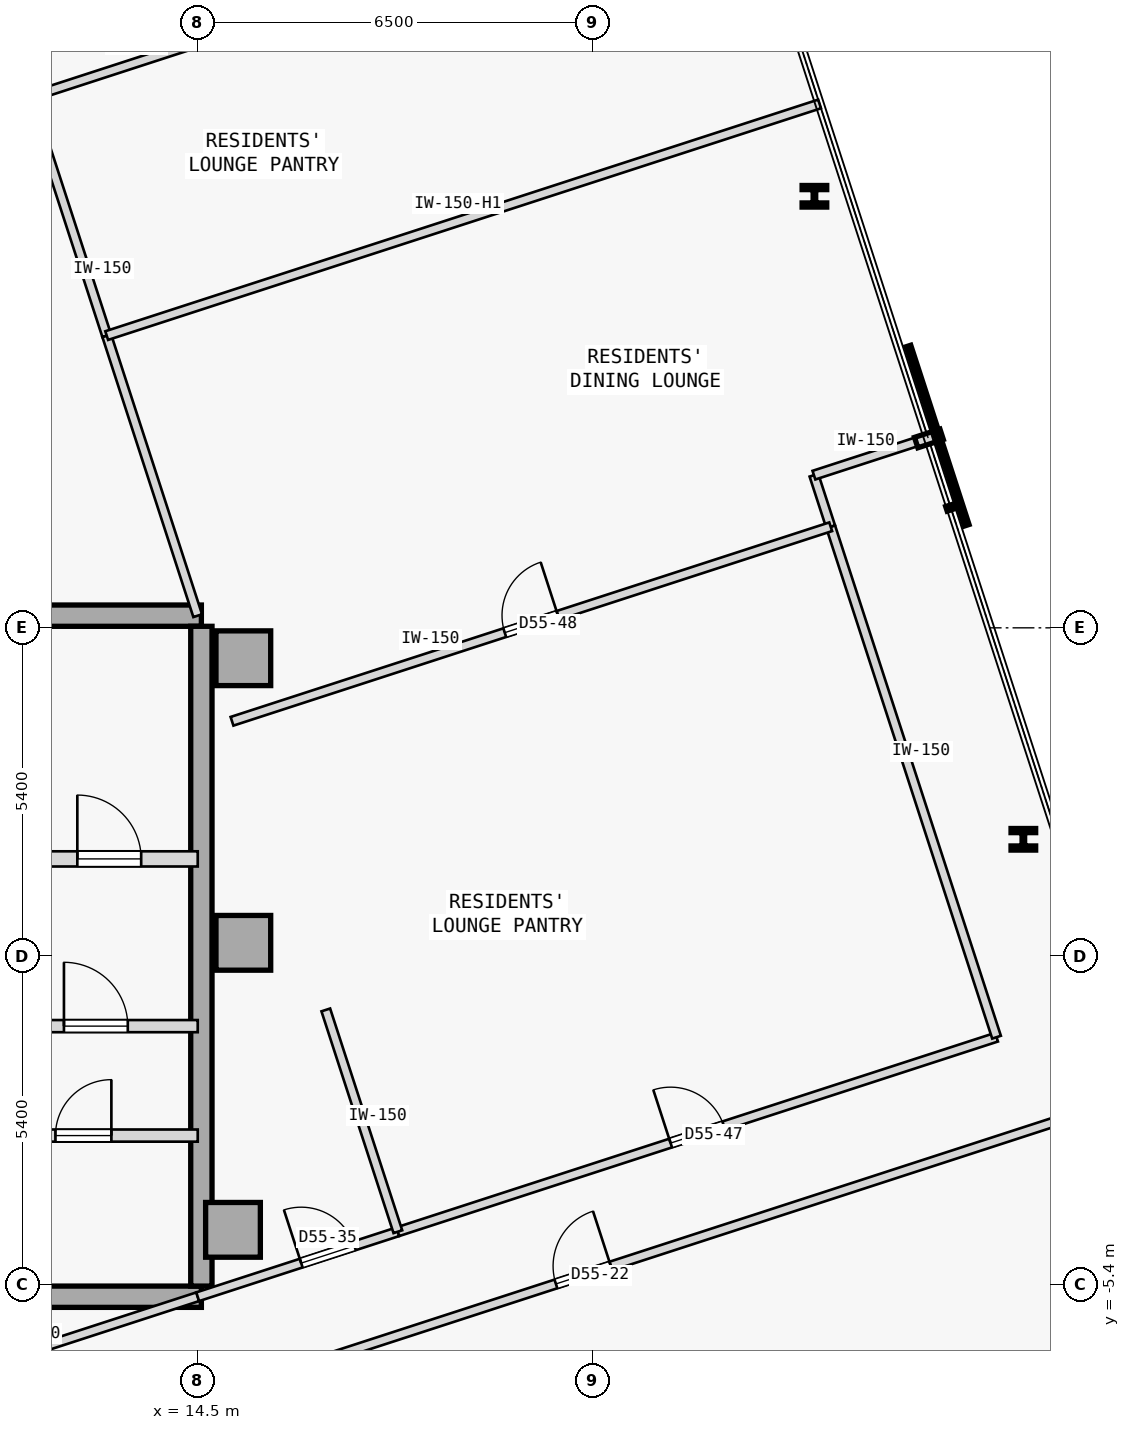
"""IFC4 building model, lengths in metres.
Left out: names, types, materials, properties, quantities, classifications, styles, units other than length and angle.
Written with IfcOpenShell. Run it as: python <this file> out.ifc"""

import sys

from ifc_helpers import new_model, si_unit, direction, frame, frame_2d, origin, origin_2d, place, context, subcontext, project, spatial, rectangle, i_section, extrude, element, fill, save


model = new_model("IFC4")
c1 = context("Model", 3, precision=1e-05, world=origin(), true_north=direction((0.0, 1.0)))
c2 = subcontext(c1, "Body", "Model", "MODEL_VIEW")
j1 = project(units=[si_unit("LENGTHUNIT", "METRE"), si_unit("PLANEANGLEUNIT", "RADIAN")], contexts=[c1])
p1 = place(None, origin())
s1 = spatial("IfcSite", under=j1, at=p1, CompositionType="ELEMENT")
p2 = place(p1, origin())
s2 = spatial("IfcBuilding", under=s1, at=p2, CompositionType="ELEMENT")
p3 = place(p2, frame((0.0, 0.0, 210.9)))
s3 = spatial("IfcBuildingStorey", under=s2, at=p3, CompositionType="ELEMENT", Elevation=210.9)
for number, where, z_axis, x_axis in (
    (1, (15.25, 4.9, 0.0), (0.0, 0.0, 1.0), (1.0, 0.0, 0.0)),
    (2, (15.25, 0.22, 0.0), (0.0, 0.0, 1.0), (1.0, 0.0, 0.0)),
    (3, (15.08, -4.5, 0.0), (0.0, 0.0, 1.0), (1.0, 0.0, 0.0)),
):
    element("IfcColumn", number, at=place(p3, frame(where, z_axis=z_axis, x_axis=x_axis)), inside=s3, PredefinedType="COLUMN", context=c2, shape_type="SweptSolid", body=[
        extrude(rectangle(XDim=0.9, YDim=0.9, at=origin_2d()), origin(), (0.0, 0.0, 1.0), 3.35),
    ])
p4 = place(p3, frame((3.15, 5.6, 0.0), z_axis=(0.0, 0.0, 1.0), x_axis=(1.0, 0.0, 0.0)))
e4 = element("IfcWall", 4, at=p4, inside=s3, PredefinedType="SHEAR", context=c2, shape_type="SweptSolid", body=[
    extrude(rectangle(XDim=11.41, YDim=0.35, at=frame_2d((5.705, 0.0))), origin(), (0.0, 0.0, 1.0), 3.125),
])
p5 = place(p3, frame((3.7, -5.6, 0.0), z_axis=(0.0, 0.0, 1.0), x_axis=(1.0, 0.0, 0.0)))
e5 = element("IfcWall", 5, at=p5, inside=s3, PredefinedType="SHEAR", context=c2, shape_type="SweptSolid", body=[
    extrude(rectangle(XDim=10.86, YDim=0.35, at=frame_2d((5.43, 0.0))), origin(), (0.0, 0.0, 1.0), 3.125),
])
p6 = place(p3, frame((14.56, -5.425, 0.0), z_axis=(0.0, 0.0, 1.0), x_axis=(0.0, 1.0, 0.0)))
e6 = element("IfcWall", 6, at=p6, inside=s3, PredefinedType="SHEAR", context=c2, shape_type="SweptSolid", body=[
    extrude(rectangle(XDim=10.85, YDim=0.35, at=frame_2d((5.425, 0.0))), origin(), (0.0, 0.0, 1.0), 3.125),
])
for number, where, z_axis, x_axis in (
    (7, (28.078, 1.922, 0.0), (0.0, 0.0, 1.0), (1.0, 0.0, 0.0)),
    (8, (24.642, 12.497, 0.0), (0.0, 0.0, 1.0), (1.0, 0.0, 0.0)),
):
    element("IfcColumn", number, at=place(p3, frame(where, z_axis=z_axis, x_axis=x_axis)), inside=s3, PredefinedType="COLUMN", context=c2, shape_type="SweptSolid", body=[
        extrude(i_section(OverallWidth=0.405, OverallDepth=0.355, WebThickness=0.042, FlangeThickness=0.068, FilletRadius=0.015, at=origin_2d()), origin(), (0.0, 0.0, 1.0), 3.35),
    ])
p7 = place(p3, frame((10.9, 1.6, 0.0), z_axis=(0.0, 0.0, 1.0), x_axis=(1.0, 0.0, 0.0)))
e9 = element("IfcWall", 9, at=p7, inside=s3, PredefinedType="STANDARD", context=c2, shape_type="SweptSolid", body=[
    extrude(rectangle(XDim=3.6, YDim=0.25, at=frame_2d((1.8, 0.0))), origin(), (0.0, 0.0, 1.0), 3.125),
])
p8 = place(p7, frame((1.62, 0.0, 0.0)))
e10 = element("IfcOpeningElement", 10, at=p8, cuts=e9, PredefinedType="OPENING", context=c2, shape_type="SweptSolid", body=[
    extrude(rectangle(XDim=1.05, YDim=2.15, at=frame_2d((0.525, 1.075))), frame((0.0, 0.135, 0.0), z_axis=(0.0, -1.0, 0.0), x_axis=(1.0, 0.0, 0.0)), (0.0, 0.0, 1.0), 0.27),
])
p9 = place(p3, frame((11.55, -1.15, 0.0), z_axis=(0.0, 0.0, 1.0), x_axis=(1.0, 0.0, 0.0)))
e11 = element("IfcWall", 11, at=p9, inside=s3, PredefinedType="STANDARD", context=c2, shape_type="SweptSolid", body=[
    extrude(rectangle(XDim=2.95, YDim=0.2, at=frame_2d((1.475, 0.0))), origin(), (0.0, 0.0, 1.0), 3.125),
])
p10 = place(p9, frame((0.75, 0.0, 0.0)))
e12 = element("IfcOpeningElement", 12, at=p10, cuts=e11, PredefinedType="OPENING", context=c2, shape_type="SweptSolid", body=[
    extrude(rectangle(XDim=1.05, YDim=2.18, at=frame_2d((0.525, 1.09))), frame((0.0, 0.11, 0.0), z_axis=(0.0, -1.0, 0.0), x_axis=(1.0, 0.0, 0.0)), (0.0, 0.0, 1.0), 0.22),
])
p11 = place(p3, frame((3.7, -2.95, 0.0), z_axis=(0.0, 0.0, 1.0), x_axis=(1.0, 0.0, 0.0)))
e13 = element("IfcWall", 13, at=p11, inside=s3, PredefinedType="STANDARD", context=c2, shape_type="SweptSolid", body=[
    extrude(rectangle(XDim=10.8, YDim=0.2, at=frame_2d((5.4, 0.0))), origin(), (0.0, 0.0, 1.0), 3.125),
])
p12 = place(p11, frame((0.53, 0.0, 0.0)))
e14 = element("IfcOpeningElement", 14, at=p12, cuts=e13, PredefinedType="OPENING", context=c2, shape_type="SweptSolid", body=[
    extrude(rectangle(XDim=1.1, YDim=2.15, at=frame_2d((0.55, 1.075))), frame((0.0, 0.11, 0.0), z_axis=(0.0, -1.0, 0.0), x_axis=(1.0, 0.0, 0.0)), (0.0, 0.0, 1.0), 0.22),
])
p13 = place(p11, frame((4.14, 0.0, 0.0)))
e15 = element("IfcOpeningElement", 15, at=p13, cuts=e13, PredefinedType="OPENING", context=c2, shape_type="SweptSolid", body=[
    extrude(rectangle(XDim=0.92, YDim=2.15, at=frame_2d((0.46, 1.075))), frame((0.0, 0.11, 0.0), z_axis=(0.0, -1.0, 0.0), x_axis=(1.0, 0.0, 0.0)), (0.0, 0.0, 1.0), 0.22),
])
p14 = place(p11, frame((8.46, 0.0, 0.0)))
e16 = element("IfcOpeningElement", 16, at=p14, cuts=e13, PredefinedType="OPENING", context=c2, shape_type="SweptSolid", body=[
    extrude(rectangle(XDim=0.92, YDim=2.15, at=frame_2d((0.46, 1.075))), frame((0.0, 0.11, 0.0), z_axis=(0.0, -1.0, 0.0), x_axis=(1.0, 0.0, 0.0)), (0.0, 0.0, 1.0), 0.22),
])
p15 = place(p3, frame((11.669, -8.223, 0.0), z_axis=(0.0, 0.0, 1.0), x_axis=(0.951057967787, 0.309012527106, 0.0)))
e17 = element("IfcWall", 17, at=p15, inside=s3, PredefinedType="PARTITIONING", context=c2, shape_type="SweptSolid", body=[
    extrude(rectangle(XDim=19.291, YDim=0.15, at=frame_2d((9.646, 0.0))), origin(), (0.0, 0.0, 1.0), 3.125),
])
p16 = place(p15, frame((9.17, 0.0, 0.0)))
e18 = element("IfcOpeningElement", 18, at=p16, cuts=e17, PredefinedType="OPENING", context=c2, shape_type="SweptSolid", body=[
    extrude(rectangle(XDim=0.95, YDim=2.15, at=frame_2d((0.475, 1.075))), frame((0.0, 0.085, 0.0), z_axis=(0.0, -1.0, 0.0), x_axis=(1.0, 0.0, 0.0)), (0.0, 0.0, 1.0), 0.17),
])
p17 = place(p3, frame((7.588, -7.846, 0.0), z_axis=(0.0, 0.0, 1.0), x_axis=(0.951058013903, 0.309012385174, 0.0)))
e19 = element("IfcWall", 19, at=p17, inside=s3, PredefinedType="PARTITIONING", context=c2, shape_type="SweptSolid", body=[
    extrude(rectangle(XDim=7.267, YDim=0.15, at=frame_2d((3.634, 0.0))), origin(), (0.0, 0.0, 1.0), 3.125),
])
p18 = place(p17, frame((0.557, 0.0, 0.0)))
e20 = element("IfcOpeningElement", 20, at=p18, cuts=e19, PredefinedType="OPENING", context=c2, shape_type="SweptSolid", body=[
    extrude(rectangle(XDim=0.92, YDim=2.15, at=frame_2d((0.46, 1.075))), frame((0.0, 0.085, 0.0), z_axis=(0.0, -1.0, 0.0), x_axis=(1.0, 0.0, 0.0)), (0.0, 0.0, 1.0), 0.17),
])
p19 = place(p3, frame((14.5, -5.6, 0.0), z_axis=(0.0, 0.0, 1.0), x_axis=(0.951047546178, 0.309044600193, 0.0)))
e21 = element("IfcWall", 21, at=p19, inside=s3, PredefinedType="PARTITIONING", context=c2, shape_type="SweptSolid", body=[
    extrude(rectangle(XDim=3.461, YDim=0.15, at=frame_2d((1.73, 0.0))), origin(), (0.0, 0.0, 1.0), 3.125),
])
p20 = place(p19, frame((1.79, 0.0, 0.0)))
e22 = element("IfcOpeningElement", 22, at=p20, cuts=e21, PredefinedType="OPENING", context=c2, shape_type="SweptSolid", body=[
    extrude(rectangle(XDim=0.92, YDim=2.15, at=frame_2d((0.46, 1.075))), frame((0.0, 0.085, 0.0), z_axis=(0.0, -1.0, 0.0), x_axis=(1.0, 0.0, 0.0)), (0.0, 0.0, 1.0), 0.17),
])
p21 = place(p3, frame((17.791, -4.531, 0.0), z_axis=(0.0, 0.0, 1.0), x_axis=(0.951056769902, 0.309016213852, 0.0)))
e23 = element("IfcWall", 23, at=p21, inside=s3, PredefinedType="PARTITIONING", context=c2, shape_type="SweptSolid", body=[
    extrude(rectangle(XDim=10.352, YDim=0.15, at=frame_2d((5.176, 0.0))), origin(), (0.0, 0.0, 1.0), 3.125),
])
p22 = place(p21, frame((4.716, 0.0, 0.0)))
e24 = element("IfcOpeningElement", 24, at=p22, cuts=e23, PredefinedType="OPENING", context=c2, shape_type="SweptSolid", body=[
    extrude(rectangle(XDim=0.92, YDim=2.15, at=frame_2d((0.46, 1.075))), frame((0.0, 0.085, 0.0), z_axis=(0.0, -1.0, 0.0), x_axis=(1.0, 0.0, 0.0)), (0.0, 0.0, 1.0), 0.17),
])
p23 = place(p3, frame((27.637, -1.332, 0.0), z_axis=(0.0, 0.0, 1.0), x_axis=(-0.309040411618, 0.951048907253, 0.0)))
e25 = element("IfcWall", 25, at=p23, inside=s3, PredefinedType="PARTITIONING", context=c2, shape_type="SweptSolid", body=[
    extrude(rectangle(XDim=8.826, YDim=0.15, at=frame_2d((4.413, 0.0))), origin(), (0.0, 0.0, 1.0), 3.125),
])
p24 = place(p3, frame((24.909, 7.062, 0.0), z_axis=(0.0, 0.0, 1.0), x_axis=(-0.30899324298, 0.951064233263, 0.0)))
e26 = element("IfcWall", 26, at=p24, inside=s3, PredefinedType="PARTITIONING", context=c2, shape_type="SweptSolid", body=[
    extrude(rectangle(XDim=0.892, YDim=0.15, at=frame_2d((0.446, 0.0))), origin(), (0.0, 0.0, 1.0), 3.125),
])
p25 = place(p3, frame((24.634, 7.91, 0.0), z_axis=(0.0, 0.0, 1.0), x_axis=(0.951054051148, 0.309024581215, 0.0)))
e27 = element("IfcWall", 27, at=p25, inside=s3, PredefinedType="PARTITIONING", context=c2, shape_type="SweptSolid", body=[
    extrude(rectangle(XDim=1.975, YDim=0.15, at=frame_2d((0.988, 0.0))), origin(), (0.0, 0.0, 1.0), 3.125),
])
p26 = place(p3, frame((11.73, 14.123, 0.0), z_axis=(0.0, 0.0, 1.0), x_axis=(0.951060263663, 0.309005460926, 0.0)))
e28 = element("IfcWall", 28, at=p26, inside=s3, PredefinedType="PARTITIONING", context=c2, shape_type="SweptSolid", body=[
    extrude(rectangle(XDim=12.327, YDim=0.15, at=frame_2d((6.164, 0.0))), origin(), (0.0, 0.0, 1.0), 3.125),
])
p27 = place(p26, frame((5.704, 0.0, 0.0)))
e29 = element("IfcOpeningElement", 29, at=p27, cuts=e28, PredefinedType="OPENING", context=c2, shape_type="SweptSolid", body=[
    extrude(rectangle(XDim=0.92, YDim=2.15, at=frame_2d((0.46, 1.075))), frame((0.0, 0.085, 0.0), z_axis=(0.0, -1.0, 0.0), x_axis=(1.0, 0.0, 0.0)), (0.0, 0.0, 1.0), 0.17),
])
p28 = place(p3, frame((17.791, -4.531, 0.0), z_axis=(0.0, 0.0, 1.0), x_axis=(-0.309018414265, 0.951056054944, 0.0)))
e30 = element("IfcWall", 30, at=p28, inside=s3, PredefinedType="PARTITIONING", context=c2, shape_type="SweptSolid", body=[
    extrude(rectangle(XDim=3.835, YDim=0.15, at=frame_2d((1.917, 0.0))), origin(), (0.0, 0.0, 1.0), 3.125),
])
p29 = place(p3, frame((14.5, 5.6, 0.0), z_axis=(0.0, 0.0, 1.0), x_axis=(-0.308974360462, 0.951070367837, 0.0)))
e31 = element("IfcWall", 31, at=p29, inside=s3, PredefinedType="PARTITIONING", context=c2, shape_type="SweptSolid", body=[
    extrude(rectangle(XDim=4.843, YDim=0.15, at=frame_2d((2.421, 0.0))), origin(), (0.0, 0.0, 1.0), 3.125),
])
p30 = place(p3, frame((13.003, 10.206, 0.0), z_axis=(0.0, 0.0, 1.0), x_axis=(-0.309035144366, 0.951050618814, 0.0)))
e32 = element("IfcWall", 32, at=p30, inside=s3, PredefinedType="PARTITIONING", context=c2, shape_type="SweptSolid", body=[
    extrude(rectangle(XDim=4.119, YDim=0.15, at=frame_2d((2.06, 0.0))), origin(), (0.0, 0.0, 1.0), 3.125),
])
p31 = place(p3, frame((15.064, 3.863, 0.0), z_axis=(0.0, 0.0, 1.0), x_axis=(0.951061448945, 0.309001812827, 0.0)))
e33 = element("IfcWall", 33, at=p31, inside=s3, PredefinedType="PARTITIONING", context=c2, shape_type="SweptSolid", body=[
    extrude(rectangle(XDim=10.352, YDim=0.15, at=frame_2d((5.176, 0.0))), origin(), (0.0, 0.0, 1.0), 3.125),
])
p32 = place(p31, frame((4.716, 0.0, 0.0)))
e34 = element("IfcOpeningElement", 34, at=p32, cuts=e33, PredefinedType="OPENING", context=c2, shape_type="SweptSolid", body=[
    extrude(rectangle(XDim=0.92, YDim=2.15, at=frame_2d((0.46, 1.075))), frame((0.0, 0.085, 0.0), z_axis=(0.0, -1.0, 0.0), x_axis=(1.0, 0.0, 0.0)), (0.0, 0.0, 1.0), 0.17),
])
p33 = place(p3, frame((13.003, 10.206, 0.0), z_axis=(0.0, 0.0, 1.0), x_axis=(0.951060263663, 0.309005460926, 0.0)))
e35 = element("IfcWall", 35, at=p33, inside=s3, PredefinedType="PARTITIONING", context=c2, shape_type="SweptSolid", body=[
    extrude(rectangle(XDim=12.327, YDim=0.15, at=frame_2d((6.164, 0.0))), origin(), (0.0, 0.0, 1.0), 2.675),
])
p34 = place(p8, origin())
e36 = element("IfcDoor", 36, at=p34, inside=s3, OperationType="SINGLE_SWING_LEFT", PredefinedType="DOOR", context=c2, shape_type="SweptSolid", body=[
    extrude(rectangle(XDim=1.05, YDim=2.15, at=frame_2d((0.525, 1.075))), frame((0.0, 0.025, 0.0), z_axis=(0.0, -1.0, 0.0), x_axis=(1.0, 0.0, 0.0)), (0.0, 0.0, 1.0), 0.05),
])
fill(e10, e36)
p35 = place(p10, origin())
e37 = element("IfcDoor", 37, at=p35, inside=s3, OperationType="SINGLE_SWING_LEFT", PredefinedType="DOOR", context=c2, shape_type="SweptSolid", body=[
    extrude(rectangle(XDim=1.05, YDim=2.18, at=frame_2d((0.525, 1.09))), frame((0.0, 0.025, 0.0), z_axis=(0.0, -1.0, 0.0), x_axis=(1.0, 0.0, 0.0)), (0.0, 0.0, 1.0), 0.05),
])
fill(e12, e37)
p36 = place(p14, origin())
e38 = element("IfcDoor", 38, at=p36, inside=s3, OperationType="SINGLE_SWING_RIGHT", PredefinedType="DOOR", context=c2, shape_type="SweptSolid", body=[
    extrude(rectangle(XDim=0.92, YDim=2.15, at=frame_2d((0.46, 1.075))), frame((0.0, 0.025, 0.0), z_axis=(0.0, -1.0, 0.0), x_axis=(1.0, 0.0, 0.0)), (0.0, 0.0, 1.0), 0.05),
])
fill(e16, e38)
p37 = place(p16, origin())
e39 = element("IfcDoor", 39, at=p37, inside=s3, OperationType="SINGLE_SWING_RIGHT", PredefinedType="DOOR", context=c2, shape_type="SweptSolid", body=[
    extrude(rectangle(XDim=0.95, YDim=2.15, at=frame_2d((0.475, 1.075))), frame((0.0, 0.025, 0.0), z_axis=(0.0, -1.0, 0.0), x_axis=(1.0, 0.0, 0.0)), (0.0, 0.0, 1.0), 0.05),
])
fill(e18, e39)
p38 = place(p20, origin())
e40 = element("IfcDoor", 40, at=p38, inside=s3, OperationType="SINGLE_SWING_LEFT", PredefinedType="DOOR", context=c2, shape_type="SweptSolid", body=[
    extrude(rectangle(XDim=0.92, YDim=2.15, at=frame_2d((0.46, 1.075))), frame((0.0, 0.025, 0.0), z_axis=(0.0, -1.0, 0.0), x_axis=(1.0, 0.0, 0.0)), (0.0, 0.0, 1.0), 0.05),
])
fill(e22, e40)
p39 = place(p22, origin())
e41 = element("IfcDoor", 41, at=p39, inside=s3, OperationType="SINGLE_SWING_LEFT", PredefinedType="DOOR", context=c2, shape_type="SweptSolid", body=[
    extrude(rectangle(XDim=0.92, YDim=2.15, at=frame_2d((0.46, 1.075))), frame((0.0, 0.025, 0.0), z_axis=(0.0, -1.0, 0.0), x_axis=(1.0, 0.0, 0.0)), (0.0, 0.0, 1.0), 0.05),
])
fill(e24, e41)
p40 = place(p32, origin())
e42 = element("IfcDoor", 42, at=p40, inside=s3, OperationType="SINGLE_SWING_RIGHT", PredefinedType="DOOR", context=c2, shape_type="SweptSolid", body=[
    extrude(rectangle(XDim=0.92, YDim=2.15, at=frame_2d((0.46, 1.075))), frame((0.0, 0.025, 0.0), z_axis=(0.0, -1.0, 0.0), x_axis=(1.0, 0.0, 0.0)), (0.0, 0.0, 1.0), 0.05),
])
fill(e34, e42)
save(model, sys.argv[1])
